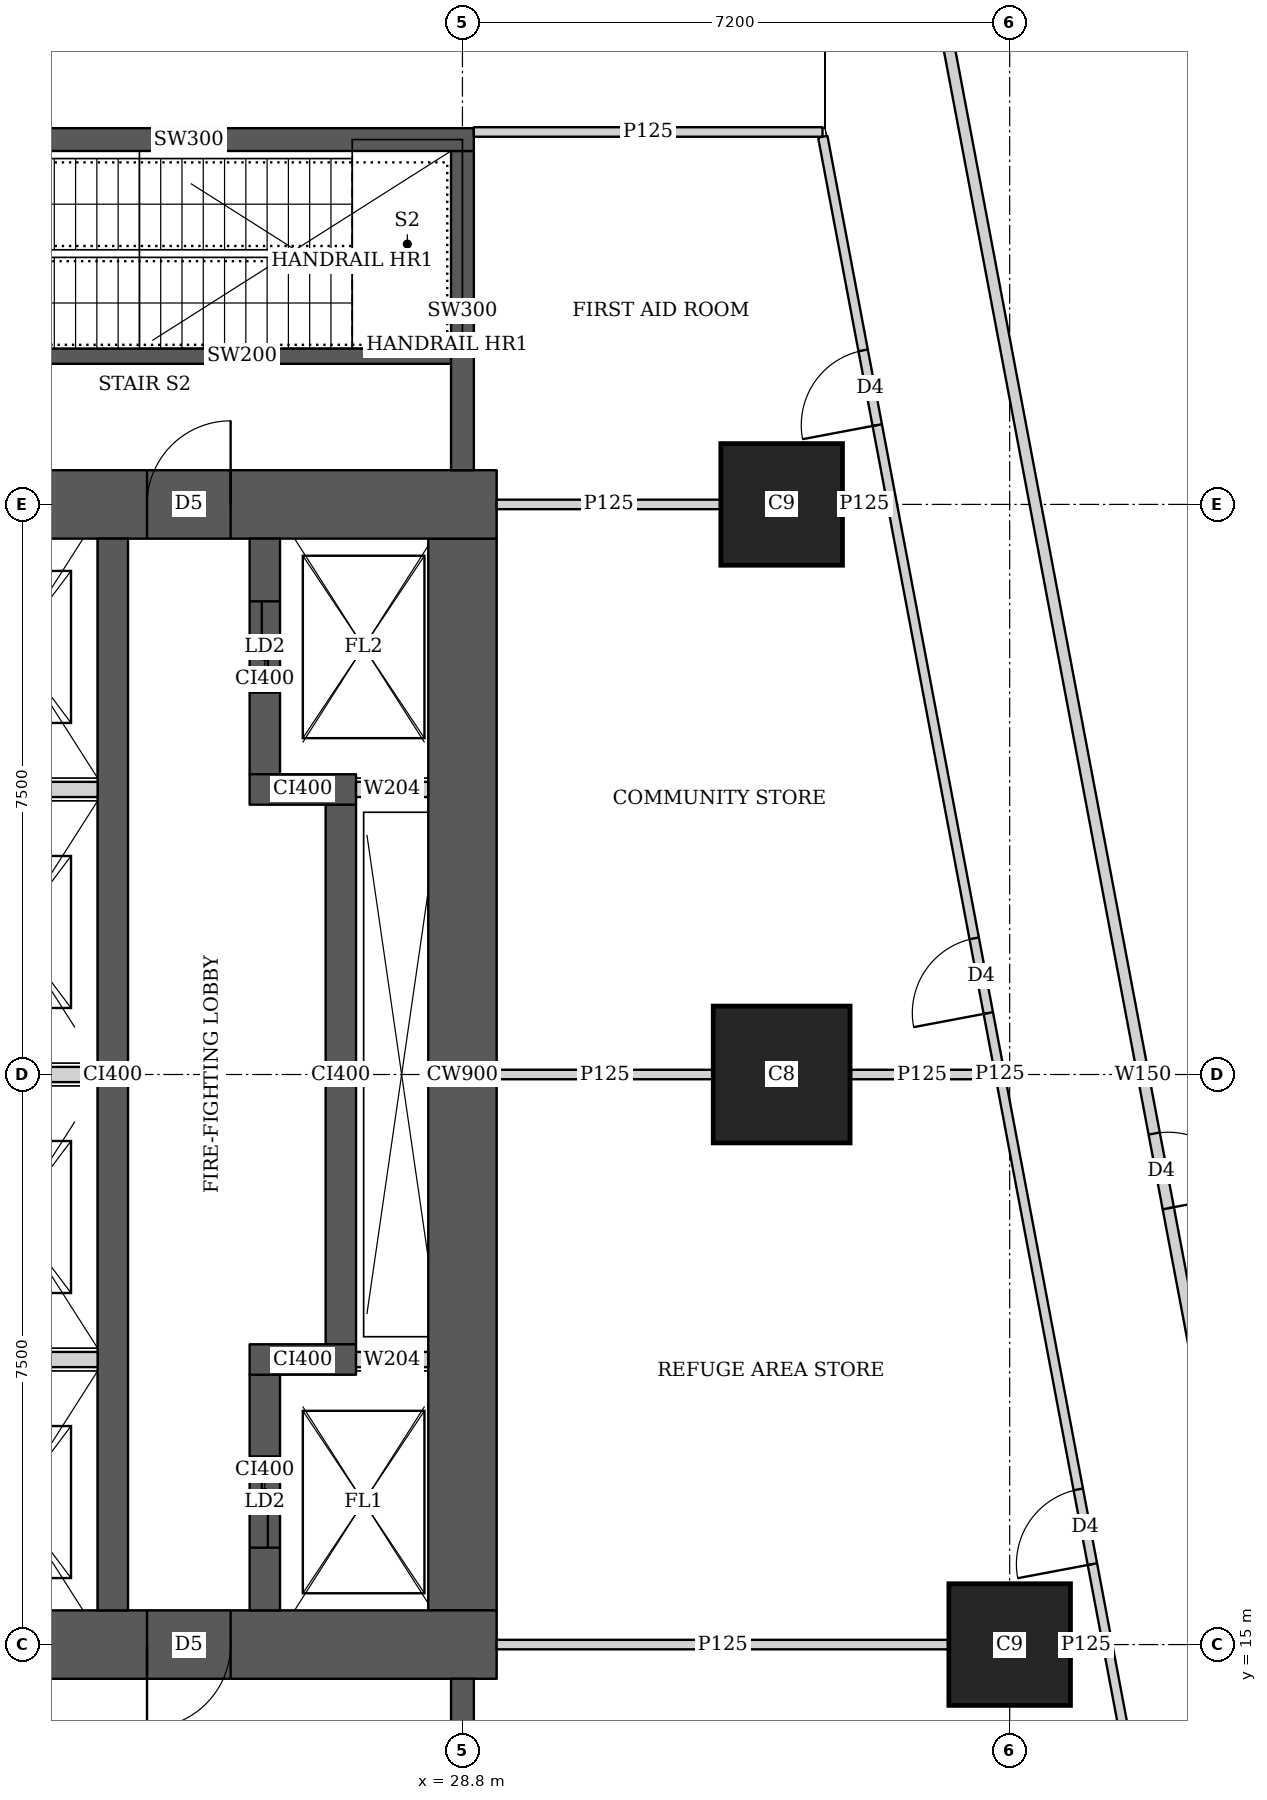
"""IFC4 building model, lengths in metres.
Left out: names, types, materials, properties, quantities, classifications, styles, units other than length and angle.
Written with IfcOpenShell. Run it as: python <this file> out.ifc"""

import sys

from ifc_helpers import new_model, si_unit, direction, frame, frame_2d, origin, origin_2d, place, context, subcontext, project, spatial, rectangle, extrude, element, fill, save


model = new_model("IFC4")
c1 = context("Model", 3, precision=1e-05, world=origin(), true_north=direction((0.0, 1.0)))
c2 = subcontext(c1, "Body", "Model", "MODEL_VIEW")
j1 = project(units=[si_unit("LENGTHUNIT", "METRE"), si_unit("PLANEANGLEUNIT", "RADIAN")], contexts=[c1])
p1 = place(None, origin())
s1 = spatial("IfcSite", under=j1, at=p1, CompositionType="ELEMENT")
p2 = place(p1, origin())
s2 = spatial("IfcBuilding", under=s1, at=p2, CompositionType="ELEMENT")
p3 = place(p2, frame((0.0, 0.0, 130.4)))
s3 = spatial("IfcBuildingStorey", under=s2, at=p3, CompositionType="ELEMENT", Elevation=130.4)
p4 = place(p3, frame((36.0, 15.0, 0.0), z_axis=(0.0, 0.0, 1.0), x_axis=(1.0, 0.0, 0.0)))
e1 = element("IfcColumn", 1, at=p4, inside=s3, PredefinedType="COLUMN", context=c2, shape_type="SweptSolid", body=[
    extrude(rectangle(XDim=1.6, YDim=1.6, at=origin_2d()), origin(), (0.0, 0.0, 1.0), 5.4),
])
p5 = place(p3, frame((33.0, 22.5, 0.0), z_axis=(0.0, 0.0, 1.0), x_axis=(1.0, 0.0, 0.0)))
e2 = element("IfcColumn", 2, at=p5, inside=s3, PredefinedType="COLUMN", context=c2, shape_type="SweptSolid", body=[
    extrude(rectangle(XDim=1.8, YDim=1.8, at=origin_2d()), origin(), (0.0, 0.0, 1.0), 5.4),
])
p6 = place(p3, frame((33.0, 30.0, 0.0), z_axis=(0.0, 0.0, 1.0), x_axis=(1.0, 0.0, 0.0)))
e3 = element("IfcColumn", 3, at=p6, inside=s3, PredefinedType="COLUMN", context=c2, shape_type="SweptSolid", body=[
    extrude(rectangle(XDim=1.6, YDim=1.6, at=origin_2d()), origin(), (0.0, 0.0, 1.0), 5.4),
])
p7 = place(p3, frame((13.95, 15.0, 0.0), z_axis=(0.0, 0.0, 1.0), x_axis=(1.0, 0.0, 0.0)))
e4 = element("IfcWall", 4, at=p7, inside=s3, PredefinedType="SHEAR", context=c2, shape_type="SweptSolid", body=[
    extrude(rectangle(XDim=15.3, YDim=0.9, at=frame_2d((7.65, 0.0))), origin(), (0.0, 0.0, 1.0), 5.4),
])
p8 = place(p7, frame((4.45, 0.0, 0.0)))
e5 = element("IfcOpeningElement", 5, at=p8, cuts=e4, PredefinedType="OPENING", context=c2, shape_type="SweptSolid", body=[
    extrude(rectangle(XDim=1.8, YDim=2.1, at=frame_2d((0.9, 1.05))), frame((0.0, 0.46, 0.0), z_axis=(0.0, -1.0, 0.0), x_axis=(1.0, 0.0, 0.0)), (0.0, 0.0, 1.0), 0.92),
])
p9 = place(p7, frame((10.7, 0.0, 0.0)))
e6 = element("IfcOpeningElement", 6, at=p9, cuts=e4, PredefinedType="OPENING", context=c2, shape_type="SweptSolid", body=[
    extrude(rectangle(XDim=1.1, YDim=2.1, at=frame_2d((0.55, 1.05))), frame((0.0, 0.46, 0.0), z_axis=(0.0, -1.0, 0.0), x_axis=(1.0, 0.0, 0.0)), (0.0, 0.0, 1.0), 0.92),
])
p10 = place(p3, frame((13.95, 30.0, 0.0), z_axis=(0.0, 0.0, 1.0), x_axis=(1.0, 0.0, 0.0)))
e7 = element("IfcWall", 7, at=p10, inside=s3, PredefinedType="SHEAR", context=c2, shape_type="SweptSolid", body=[
    extrude(rectangle(XDim=15.3, YDim=0.9, at=frame_2d((7.65, 0.0))), origin(), (0.0, 0.0, 1.0), 5.4),
])
p11 = place(p10, frame((4.45, 0.0, 0.0)))
e8 = element("IfcOpeningElement", 8, at=p11, cuts=e7, PredefinedType="OPENING", context=c2, shape_type="SweptSolid", body=[
    extrude(rectangle(XDim=1.8, YDim=2.1, at=frame_2d((0.9, 1.05))), frame((0.0, 0.46, 0.0), z_axis=(0.0, -1.0, 0.0), x_axis=(1.0, 0.0, 0.0)), (0.0, 0.0, 1.0), 0.92),
])
p12 = place(p10, frame((10.7, 0.0, 0.0)))
e9 = element("IfcOpeningElement", 9, at=p12, cuts=e7, PredefinedType="OPENING", context=c2, shape_type="SweptSolid", body=[
    extrude(rectangle(XDim=1.1, YDim=2.1, at=frame_2d((0.55, 1.05))), frame((0.0, 0.46, 0.0), z_axis=(0.0, -1.0, 0.0), x_axis=(1.0, 0.0, 0.0)), (0.0, 0.0, 1.0), 0.92),
])
p13 = place(p3, frame((28.8, 15.45, 0.0), z_axis=(0.0, 0.0, 1.0), x_axis=(0.0, 1.0, 0.0)))
e10 = element("IfcWall", 10, at=p13, inside=s3, PredefinedType="SHEAR", context=c2, shape_type="SweptSolid", body=[
    extrude(rectangle(XDim=14.1, YDim=0.9, at=frame_2d((7.05, 0.0))), origin(), (0.0, 0.0, 1.0), 5.4),
])
p14 = place(p3, frame((24.2, 15.45, 0.0), z_axis=(0.0, 0.0, 1.0), x_axis=(0.0, 1.0, 0.0)))
e11 = element("IfcWall", 11, at=p14, inside=s3, PredefinedType="SHEAR", context=c2, shape_type="SweptSolid", body=[
    extrude(rectangle(XDim=14.1, YDim=0.4, at=frame_2d((7.05, 0.0))), origin(), (0.0, 0.0, 1.0), 5.4),
])
p15 = place(p3, frame((26.2, 15.45, 0.0), z_axis=(0.0, 0.0, 1.0), x_axis=(0.0, 1.0, 0.0)))
e12 = element("IfcWall", 12, at=p15, inside=s3, PredefinedType="SHEAR", context=c2, shape_type="SweptSolid", body=[
    extrude(rectangle(XDim=3.1, YDim=0.4, at=frame_2d((1.55, 0.0))), origin(), (0.0, 0.0, 1.0), 5.4),
])
p16 = place(p15, frame((0.825, 0.0, 0.0)))
e13 = element("IfcOpeningElement", 13, at=p16, cuts=e12, PredefinedType="OPENING", context=c2, shape_type="SweptSolid", body=[
    extrude(rectangle(XDim=1.2, YDim=2.1, at=frame_2d((0.6, 1.05))), frame((0.0, 0.21, 0.0), z_axis=(0.0, -1.0, 0.0), x_axis=(1.0, 0.0, 0.0)), (0.0, 0.0, 1.0), 0.42),
])
p17 = place(p3, frame((26.0, 18.75, 0.0), z_axis=(0.0, 0.0, 1.0), x_axis=(1.0, 0.0, 0.0)))
e14 = element("IfcWall", 14, at=p17, inside=s3, PredefinedType="SHEAR", context=c2, shape_type="SweptSolid", body=[
    extrude(rectangle(XDim=1.4, YDim=0.4, at=frame_2d((0.7, 0.0))), origin(), (0.0, 0.0, 1.0), 5.4),
])
p18 = place(p3, frame((27.2, 18.95, 0.0), z_axis=(0.0, 0.0, 1.0), x_axis=(0.0, 1.0, 0.0)))
e15 = element("IfcWall", 15, at=p18, inside=s3, PredefinedType="SHEAR", context=c2, shape_type="SweptSolid", body=[
    extrude(rectangle(XDim=7.1, YDim=0.4, at=frame_2d((3.55, 0.0))), origin(), (0.0, 0.0, 1.0), 5.4),
])
p19 = place(p3, frame((26.0, 26.25, 0.0), z_axis=(0.0, 0.0, 1.0), x_axis=(1.0, 0.0, 0.0)))
e16 = element("IfcWall", 16, at=p19, inside=s3, PredefinedType="SHEAR", context=c2, shape_type="SweptSolid", body=[
    extrude(rectangle(XDim=1.4, YDim=0.4, at=frame_2d((0.7, 0.0))), origin(), (0.0, 0.0, 1.0), 5.4),
])
p20 = place(p3, frame((26.2, 26.45, 0.0), z_axis=(0.0, 0.0, 1.0), x_axis=(0.0, 1.0, 0.0)))
e17 = element("IfcWall", 17, at=p20, inside=s3, PredefinedType="SHEAR", context=c2, shape_type="SweptSolid", body=[
    extrude(rectangle(XDim=3.1, YDim=0.4, at=frame_2d((1.55, 0.0))), origin(), (0.0, 0.0, 1.0), 5.4),
])
p21 = place(p20, frame((1.075, 0.0, 0.0)))
e18 = element("IfcOpeningElement", 18, at=p21, cuts=e17, PredefinedType="OPENING", context=c2, shape_type="SweptSolid", body=[
    extrude(rectangle(XDim=1.2, YDim=2.1, at=frame_2d((0.6, 1.05))), frame((0.0, 0.21, 0.0), z_axis=(0.0, -1.0, 0.0), x_axis=(1.0, 0.0, 0.0)), (0.0, 0.0, 1.0), 0.42),
])
p22 = place(p3, frame((28.8, 10.35, 0.0), z_axis=(0.0, 0.0, 1.0), x_axis=(0.0, 1.0, 0.0)))
e19 = element("IfcWall", 19, at=p22, inside=s3, PredefinedType="SHEAR", context=c2, shape_type="SweptSolid", body=[
    extrude(rectangle(XDim=4.2, YDim=0.3, at=frame_2d((2.1, 0.0))), origin(), (0.0, 0.0, 1.0), 5.4),
])
p23 = place(p3, frame((21.45, 34.8, 0.0), z_axis=(0.0, 0.0, 1.0), x_axis=(1.0, 0.0, 0.0)))
e20 = element("IfcWall", 20, at=p23, inside=s3, PredefinedType="SHEAR", context=c2, shape_type="SweptSolid", body=[
    extrude(rectangle(XDim=7.5, YDim=0.3, at=frame_2d((3.75, 0.0))), origin(), (0.0, 0.0, 1.0), 5.4),
])
p24 = place(p23, frame((0.5, 0.0, 0.0)))
e21 = element("IfcOpeningElement", 21, at=p24, cuts=e20, PredefinedType="OPENING", context=c2, shape_type="SweptSolid", body=[
    extrude(rectangle(XDim=1.1, YDim=2.1, at=frame_2d((0.55, 1.05))), frame((0.0, 0.16, 0.0), z_axis=(0.0, -1.0, 0.0), x_axis=(1.0, 0.0, 0.0)), (0.0, 0.0, 1.0), 0.32),
])
p25 = place(p3, frame((28.8, 30.45, 0.0), z_axis=(0.0, 0.0, 1.0), x_axis=(0.0, 1.0, 0.0)))
e22 = element("IfcWall", 22, at=p25, inside=s3, PredefinedType="SHEAR", context=c2, shape_type="SweptSolid", body=[
    extrude(rectangle(XDim=4.2, YDim=0.3, at=frame_2d((2.1, 0.0))), origin(), (0.0, 0.0, 1.0), 5.4),
])
p26 = place(p3, frame((33.382, 45.65, 0.0), z_axis=(0.0, 0.0, 1.0), x_axis=(0.185593544777, -0.982626600565, 0.0)))
e23 = element("IfcWall", 23, at=p26, inside=s3, PredefinedType="SOLIDWALL", context=c2, shape_type="SweptSolid", body=[
    extrude(rectangle(XDim=47.118, YDim=0.15, at=frame_2d((23.559, 0.0))), origin(), (0.0, 0.0, 1.0), 3.35),
])
p27 = place(p26, frame((24.35, 0.0, 0.0)))
e24 = element("IfcOpeningElement", 24, at=p27, cuts=e23, PredefinedType="OPENING", context=c2, shape_type="SweptSolid", body=[
    extrude(rectangle(XDim=1.0, YDim=2.1, at=frame_2d((0.5, 1.05))), frame((0.0, 0.085, 0.0), z_axis=(0.0, -1.0, 0.0), x_axis=(1.0, 0.0, 0.0)), (0.0, 0.0, 1.0), 0.17),
])
p28 = place(p3, frame((28.95, 34.9, 0.0), z_axis=(0.0, 0.0, 1.0), x_axis=(1.0, 0.0, 0.0)))
e25 = element("IfcWall", 25, at=p28, inside=s3, PredefinedType="PARTITIONING", context=c2, shape_type="SweptSolid", body=[
    extrude(rectangle(XDim=4.588, YDim=0.125, at=frame_2d((2.294, 0.0))), origin(), (0.0, 0.0, 1.0), 3.15),
])
p29 = place(p3, frame((38.202, 10.163, 0.0), z_axis=(0.0, 0.0, 1.0), x_axis=(-0.185610321132, 0.982623431783, 0.0)))
e26 = element("IfcWall", 26, at=p29, inside=s3, PredefinedType="PARTITIONING", context=c2, shape_type="SweptSolid", body=[
    extrude(rectangle(XDim=25.111, YDim=0.125, at=frame_2d((12.556, 0.0))), origin(), (0.0, 0.0, 1.0), 3.55),
])
p30 = place(p29, frame((0.708, 0.0, 0.0)))
e27 = element("IfcOpeningElement", 27, at=p30, cuts=e26, PredefinedType="OPENING", context=c2, shape_type="SweptSolid", body=[
    extrude(rectangle(XDim=1.0, YDim=2.1, at=frame_2d((0.5, 1.05))), frame((0.0, 0.073, 0.0), z_axis=(0.0, -1.0, 0.0), x_axis=(1.0, 0.0, 0.0)), (0.0, 0.0, 1.0), 0.145),
])
p31 = place(p29, frame((6.0, 0.0, 0.0)))
e28 = element("IfcOpeningElement", 28, at=p31, cuts=e26, PredefinedType="OPENING", context=c2, shape_type="SweptSolid", body=[
    extrude(rectangle(XDim=1.0, YDim=2.1, at=frame_2d((0.5, 1.05))), frame((0.0, 0.073, 0.0), z_axis=(0.0, -1.0, 0.0), x_axis=(1.0, 0.0, 0.0)), (0.0, 0.0, 1.0), 0.145),
])
p32 = place(p29, frame((13.378, 0.0, 0.0)))
e29 = element("IfcOpeningElement", 29, at=p32, cuts=e26, PredefinedType="OPENING", context=c2, shape_type="SweptSolid", body=[
    extrude(rectangle(XDim=1.0, YDim=2.1, at=frame_2d((0.5, 1.05))), frame((0.0, 0.073, 0.0), z_axis=(0.0, -1.0, 0.0), x_axis=(1.0, 0.0, 0.0)), (0.0, 0.0, 1.0), 0.145),
])
p33 = place(p29, frame((21.25, 0.0, 0.0)))
e30 = element("IfcOpeningElement", 30, at=p33, cuts=e26, PredefinedType="OPENING", context=c2, shape_type="SweptSolid", body=[
    extrude(rectangle(XDim=1.0, YDim=2.1, at=frame_2d((0.5, 1.05))), frame((0.0, 0.073, 0.0), z_axis=(0.0, -1.0, 0.0), x_axis=(1.0, 0.0, 0.0)), (0.0, 0.0, 1.0), 0.145),
])
p34 = place(p3, frame((29.25, 15.0, 0.0), z_axis=(0.0, 0.0, 1.0), x_axis=(1.0, 0.0, 0.0)))
e31 = element("IfcWall", 31, at=p34, inside=s3, PredefinedType="PARTITIONING", context=c2, shape_type="SweptSolid", body=[
    extrude(rectangle(XDim=5.949, YDim=0.125, at=frame_2d((2.975, 0.0))), origin(), (0.0, 0.0, 1.0), 3.55),
])
p35 = place(p3, frame((36.801, 15.0, 0.0), z_axis=(0.0, 0.0, 1.0), x_axis=(1.0, 0.0, 0.0)))
e32 = element("IfcWall", 32, at=p35, inside=s3, PredefinedType="PARTITIONING", context=c2, shape_type="SweptSolid", body=[
    extrude(rectangle(XDim=0.412, YDim=0.125, at=frame_2d((0.206, 0.0))), origin(), (0.0, 0.0, 1.0), 3.55),
])
p36 = place(p3, frame((29.25, 22.5, 0.0), z_axis=(0.0, 0.0, 1.0), x_axis=(1.0, 0.0, 0.0)))
e33 = element("IfcWall", 33, at=p36, inside=s3, PredefinedType="PARTITIONING", context=c2, shape_type="SweptSolid", body=[
    extrude(rectangle(XDim=2.849, YDim=0.125, at=frame_2d((1.425, 0.0))), origin(), (0.0, 0.0, 1.0), 3.55),
])
p37 = place(p3, frame((33.901, 22.5, 0.0), z_axis=(0.0, 0.0, 1.0), x_axis=(1.0, 0.0, 0.0)))
e34 = element("IfcWall", 34, at=p37, inside=s3, PredefinedType="PARTITIONING", context=c2, shape_type="SweptSolid", body=[
    extrude(rectangle(XDim=1.895, YDim=0.125, at=frame_2d((0.948, 0.0))), origin(), (0.0, 0.0, 1.0), 3.55),
])
p38 = place(p3, frame((29.25, 30.0, 0.0), z_axis=(0.0, 0.0, 1.0), x_axis=(1.0, 0.0, 0.0)))
e35 = element("IfcWall", 35, at=p38, inside=s3, PredefinedType="PARTITIONING", context=c2, shape_type="SweptSolid", body=[
    extrude(rectangle(XDim=2.949, YDim=0.125, at=frame_2d((1.475, 0.0))), origin(), (0.0, 0.0, 1.0), 3.55),
])
p39 = place(p3, frame((33.801, 30.0, 0.0), z_axis=(0.0, 0.0, 1.0), x_axis=(1.0, 0.0, 0.0)))
e36 = element("IfcWall", 36, at=p39, inside=s3, PredefinedType="PARTITIONING", context=c2, shape_type="SweptSolid", body=[
    extrude(rectangle(XDim=0.578, YDim=0.125, at=frame_2d((0.289, 0.0))), origin(), (0.0, 0.0, 1.0), 3.55),
])
p40 = place(p3, frame((23.0, 31.95, 0.0), z_axis=(0.0, 0.0, 1.0), x_axis=(1.0, 0.0, 0.0)))
e37 = element("IfcWall", 37, at=p40, inside=s3, PredefinedType="SHEAR", context=c2, shape_type="SweptSolid", body=[
    extrude(rectangle(XDim=5.8, YDim=0.2, at=frame_2d((2.9, 0.0))), origin(), (0.0, 0.0, 1.0), 5.4),
])
for number, where, z_axis, x_axis in (
    (38, (21.8, 18.75, 0.0), (0.0, 0.0, 1.0), (1.0, 0.0, 0.0)),
    (39, (21.8, 22.5, 0.0), (0.0, 0.0, 1.0), (1.0, 0.0, 0.0)),
    (40, (21.8, 26.25, 0.0), (0.0, 0.0, 1.0), (1.0, 0.0, 0.0)),
):
    element("IfcWall", number, at=place(p3, frame(where, z_axis=z_axis, x_axis=x_axis)), inside=s3, PredefinedType="SOLIDWALL", context=c2, shape_type="SweptSolid", body=[
        extrude(rectangle(XDim=2.2, YDim=0.2, at=frame_2d((1.1, 0.0))), origin(), (0.0, 0.0, 1.0), 5.15),
    ])
for number, where, z_axis, x_axis in (
    (41, (27.4, 18.75, 0.0), (0.0, 0.0, 1.0), (1.0, 0.0, 0.0)),
    (42, (27.4, 26.25, 0.0), (0.0, 0.0, 1.0), (1.0, 0.0, 0.0)),
):
    element("IfcWall", number, at=place(p3, frame(where, z_axis=z_axis, x_axis=x_axis)), inside=s3, PredefinedType="SOLIDWALL", context=c2, shape_type="SweptSolid", body=[
        extrude(rectangle(XDim=0.95, YDim=0.2, at=frame_2d((0.475, 0.0))), origin(), (0.0, 0.0, 1.0), 5.15),
    ])
p41 = place(p27, origin())
e43 = element("IfcDoor", 43, at=p41, inside=s3, OperationType="SINGLE_SWING_RIGHT", PredefinedType="DOOR", context=c2, shape_type="SweptSolid", body=[
    extrude(rectangle(XDim=1.0, YDim=2.1, at=frame_2d((0.5, 1.05))), frame((0.0, 0.025, 0.0), z_axis=(0.0, -1.0, 0.0), x_axis=(1.0, 0.0, 0.0)), (0.0, 0.0, 1.0), 0.05),
])
fill(e24, e43)
p42 = place(p31, origin())
e44 = element("IfcDoor", 44, at=p42, inside=s3, OperationType="SINGLE_SWING_LEFT", PredefinedType="DOOR", context=c2, shape_type="SweptSolid", body=[
    extrude(rectangle(XDim=1.0, YDim=2.1, at=frame_2d((0.5, 1.05))), frame((0.0, 0.025, 0.0), z_axis=(0.0, -1.0, 0.0), x_axis=(1.0, 0.0, 0.0)), (0.0, 0.0, 1.0), 0.05),
])
fill(e28, e44)
p43 = place(p32, origin())
e45 = element("IfcDoor", 45, at=p43, inside=s3, OperationType="SINGLE_SWING_LEFT", PredefinedType="DOOR", context=c2, shape_type="SweptSolid", body=[
    extrude(rectangle(XDim=1.0, YDim=2.1, at=frame_2d((0.5, 1.05))), frame((0.0, 0.025, 0.0), z_axis=(0.0, -1.0, 0.0), x_axis=(1.0, 0.0, 0.0)), (0.0, 0.0, 1.0), 0.05),
])
fill(e29, e45)
p44 = place(p33, origin())
e46 = element("IfcDoor", 46, at=p44, inside=s3, OperationType="SINGLE_SWING_LEFT", PredefinedType="DOOR", context=c2, shape_type="SweptSolid", body=[
    extrude(rectangle(XDim=1.0, YDim=2.1, at=frame_2d((0.5, 1.05))), frame((0.0, 0.025, 0.0), z_axis=(0.0, -1.0, 0.0), x_axis=(1.0, 0.0, 0.0)), (0.0, 0.0, 1.0), 0.05),
])
fill(e30, e46)
p45 = place(p9, origin())
e47 = element("IfcDoor", 47, at=p45, inside=s3, OperationType="SINGLE_SWING_RIGHT", PredefinedType="DOOR", context=c2, shape_type="SweptSolid", body=[
    extrude(rectangle(XDim=1.1, YDim=2.1, at=frame_2d((0.55, 1.05))), frame((0.0, 0.025, 0.0), z_axis=(0.0, -1.0, 0.0), x_axis=(1.0, 0.0, 0.0)), (0.0, 0.0, 1.0), 0.05),
])
fill(e6, e47)
p46 = place(p12, origin())
e48 = element("IfcDoor", 48, at=p46, inside=s3, OperationType="SINGLE_SWING_RIGHT", PredefinedType="DOOR", context=c2, shape_type="SweptSolid", body=[
    extrude(rectangle(XDim=1.1, YDim=2.1, at=frame_2d((0.55, 1.05))), frame((0.0, 0.025, 0.0), z_axis=(0.0, -1.0, 0.0), x_axis=(1.0, 0.0, 0.0)), (0.0, 0.0, 1.0), 0.05),
])
fill(e9, e48)
p47 = place(p16, origin())
e49 = element("IfcDoor", 49, at=p47, inside=s3, OperationType="DOUBLE_DOOR_SLIDING", PredefinedType="DOOR", context=c2, shape_type="SweptSolid", body=[
    extrude(rectangle(XDim=1.2, YDim=2.1, at=frame_2d((0.6, 1.05))), frame((0.0, 0.025, 0.0), z_axis=(0.0, -1.0, 0.0), x_axis=(1.0, 0.0, 0.0)), (0.0, 0.0, 1.0), 0.05),
])
fill(e13, e49)
p48 = place(p21, origin())
e50 = element("IfcDoor", 50, at=p48, inside=s3, OperationType="DOUBLE_DOOR_SLIDING", PredefinedType="DOOR", context=c2, shape_type="SweptSolid", body=[
    extrude(rectangle(XDim=1.2, YDim=2.1, at=frame_2d((0.6, 1.05))), frame((0.0, 0.025, 0.0), z_axis=(0.0, -1.0, 0.0), x_axis=(1.0, 0.0, 0.0)), (0.0, 0.0, 1.0), 0.05),
])
fill(e18, e50)
save(model, sys.argv[1])
